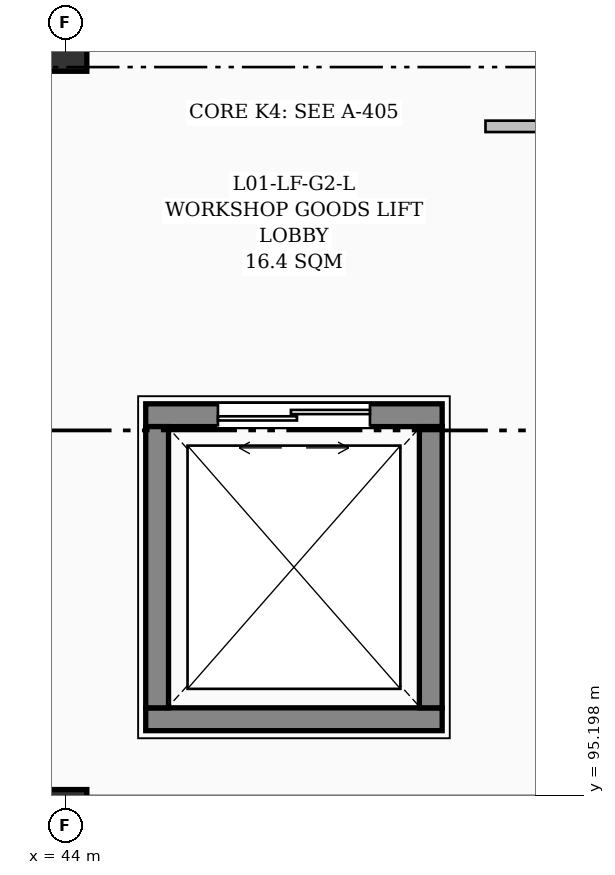
"""IFC4 building model, lengths in metres.
Left out: names, types, materials, properties, quantities, classifications, styles, units other than length and angle.
Written with IfcOpenShell. Run it as: python <this file> out.ifc"""

import sys

from ifc_helpers import new_model, si_unit, direction, frame, frame_2d, origin, origin_2d, place, context, subcontext, project, spatial, rectangle, extrude, element, fill, save


model = new_model("IFC4")
c1 = context("Model", 3, precision=1e-05, world=origin(), true_north=direction((0.0, 1.0)))
c2 = subcontext(c1, "Body", "Model", "MODEL_VIEW")
j1 = project(units=[si_unit("LENGTHUNIT", "METRE"), si_unit("PLANEANGLEUNIT", "RADIAN")], contexts=[c1])
p1 = place(None, origin())
s1 = spatial("IfcSite", under=j1, at=p1, CompositionType="ELEMENT")
p2 = place(p1, origin())
s2 = spatial("IfcBuilding", under=s1, at=p2, CompositionType="ELEMENT")
p3 = place(p2, frame((0.0, 0.0, 4.8)))
s3 = spatial("IfcBuildingStorey", under=s2, at=p3, CompositionType="ELEMENT", Elevation=4.8)
for number, where, z_axis, x_axis in (
    (1, (44.0, 95.0, 0.0), (0.0, 0.0, 1.0), (1.0, 0.0, 0.0)),
    (2, (44.0, 105.0, 0.0), (0.0, 0.0, 1.0), (1.0, 0.0, 0.0)),
):
    element("IfcColumn", number, at=place(p3, frame(where, z_axis=z_axis, x_axis=x_axis)), inside=s3, PredefinedType="COLUMN", context=c2, shape_type="SweptSolid", body=[
        extrude(rectangle(XDim=0.55, YDim=0.55, at=origin_2d()), origin(), (0.0, 0.0, 1.0), 4.5),
    ])
p4 = place(p3, frame((45.05, 96.2, 0.0), z_axis=(0.0, 0.0, 1.0), x_axis=(1.0, 0.0, 0.0)))
e3 = element("IfcWall", 3, at=p4, inside=s3, PredefinedType="SHEAR", context=c2, shape_type="SweptSolid", body=[
    extrude(rectangle(XDim=3.9, YDim=0.3, at=frame_2d((1.95, 0.0))), origin(), (0.0, 0.0, 1.0), 4.25),
])
p5 = place(p3, frame((48.95, 100.2, 0.0), z_axis=(0.0, 0.0, 1.0), x_axis=(-1.0, 0.0, 0.0)))
e4 = element("IfcWall", 4, at=p5, inside=s3, PredefinedType="SHEAR", context=c2, shape_type="SweptSolid", body=[
    extrude(rectangle(XDim=3.9, YDim=0.3, at=frame_2d((1.95, 0.0))), origin(), (0.0, 0.0, 1.0), 4.25),
])
p6 = place(p5, frame((0.95, 0.0, 0.0)))
e5 = element("IfcOpeningElement", 5, at=p6, cuts=e4, PredefinedType="OPENING", context=c2, shape_type="SweptSolid", body=[
    extrude(rectangle(XDim=2.0, YDim=2.4, at=frame_2d((1.0, 1.2))), frame((0.0, 0.16, 0.0), z_axis=(0.0, -1.0, 0.0), x_axis=(1.0, 0.0, 0.0)), (0.0, 0.0, 1.0), 0.32),
])
for number, where, z_axis, x_axis in (
    (6, (45.2, 96.35, 0.0), (0.0, 0.0, 1.0), (0.0, 1.0, 0.0)),
    (7, (48.8, 100.05, 0.0), (0.0, 0.0, 1.0), (0.0, -1.0, 0.0)),
):
    element("IfcWall", number, at=place(p3, frame(where, z_axis=z_axis, x_axis=x_axis)), inside=s3, PredefinedType="SHEAR", context=c2, shape_type="SweptSolid", body=[
        extrude(rectangle(XDim=3.7, YDim=0.3, at=frame_2d((1.85, 0.0))), origin(), (0.0, 0.0, 1.0), 4.25),
    ])
p7 = place(p3, frame((49.52, 104.0, 0.0), z_axis=(0.0, 0.0, 1.0), x_axis=(1.0, 0.0, 0.0)))
e8 = element("IfcWall", 8, at=p7, inside=s3, PredefinedType="PARTITIONING", context=c2, shape_type="SweptSolid", body=[
    extrude(rectangle(XDim=18.36, YDim=0.15, at=frame_2d((9.18, 0.0))), origin(), (0.0, 0.0, 1.0), 4.25),
])
p8 = place(p7, frame((6.352, 0.0, 0.0)))
e9 = element("IfcOpeningElement", 9, at=p8, cuts=e8, PredefinedType="OPENING", context=c2, shape_type="SweptSolid", body=[
    extrude(rectangle(XDim=1.25, YDim=2.15, at=frame_2d((0.625, 1.075))), frame((0.0, 0.085, 0.0), z_axis=(0.0, -1.0, 0.0), x_axis=(1.0, 0.0, 0.0)), (0.0, 0.0, 1.0), 0.17),
])
p9 = place(p6, origin())
e10 = element("IfcDoor", 10, at=p9, inside=s3, OperationType="DOUBLE_DOOR_SLIDING", PredefinedType="DOOR", context=c2, shape_type="SweptSolid", body=[
    extrude(rectangle(XDim=2.0, YDim=2.4, at=frame_2d((1.0, 1.2))), frame((0.0, 0.025, 0.0), z_axis=(0.0, -1.0, 0.0), x_axis=(1.0, 0.0, 0.0)), (0.0, 0.0, 1.0), 0.05),
])
fill(e5, e10)
save(model, sys.argv[1])
